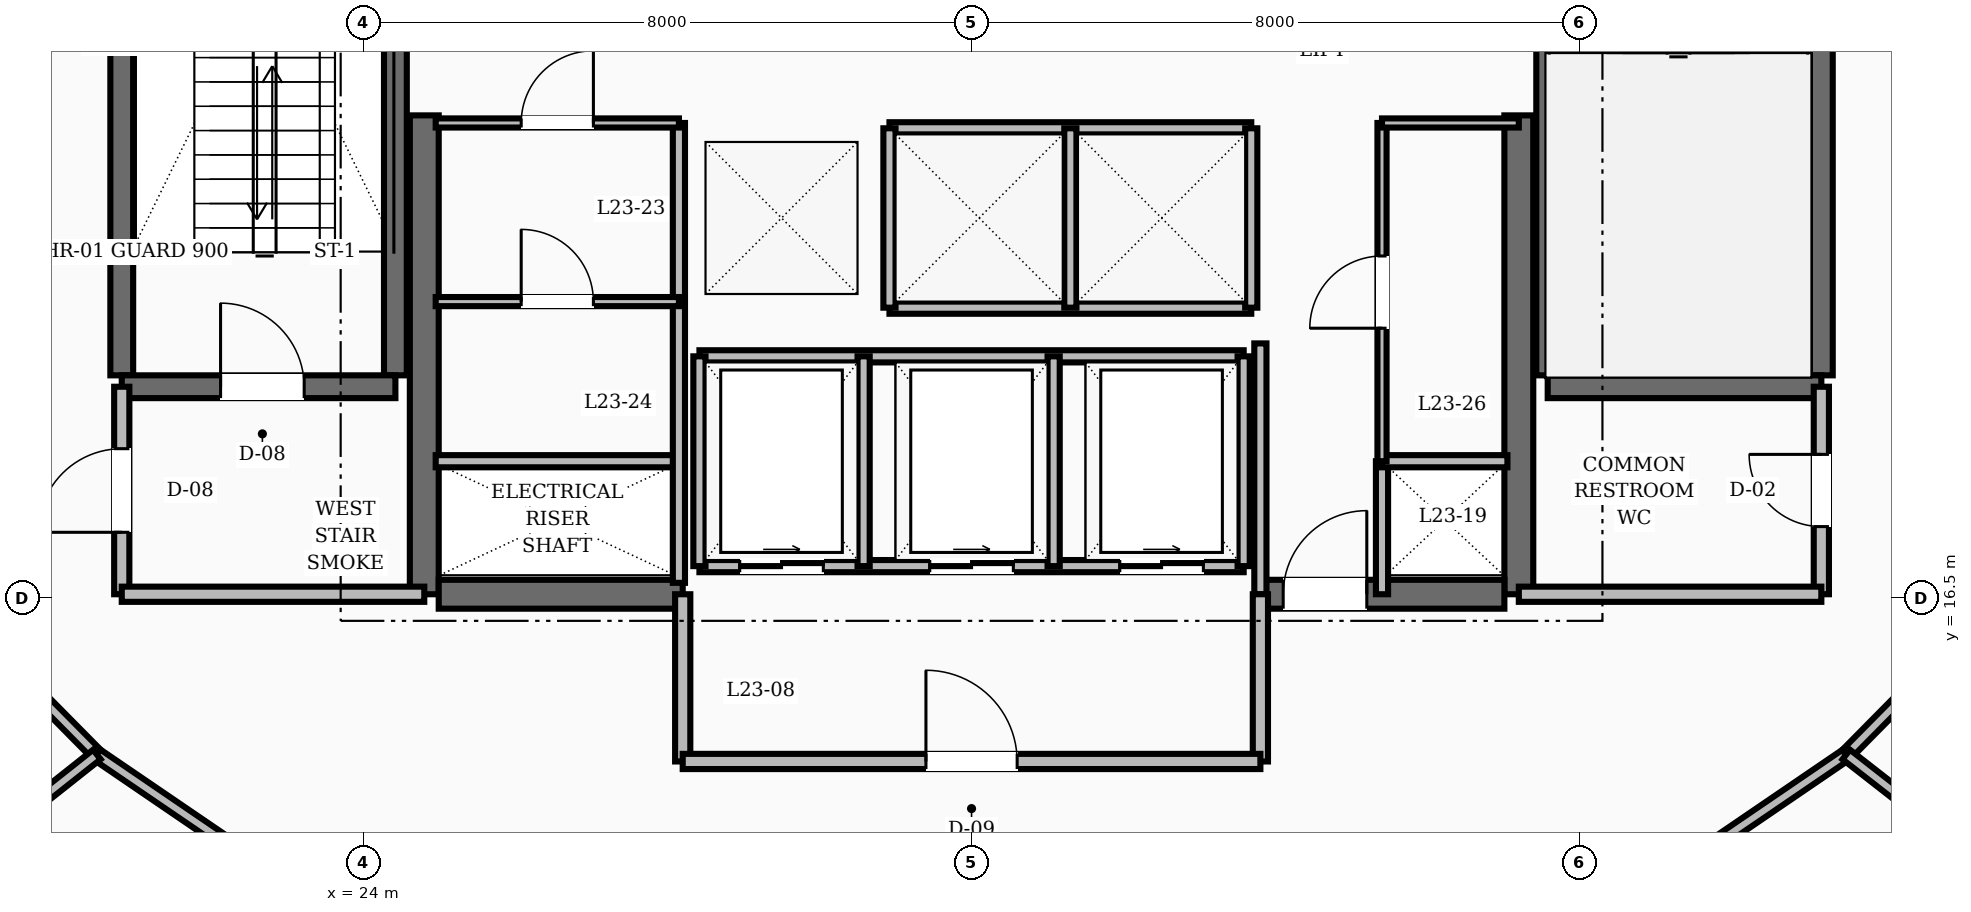
"""IFC4 building model, lengths in metres.
Left out: names, types, materials, properties, quantities, classifications, styles, units other than length and angle.
Written with IfcOpenShell. Run it as: python <this file> out.ifc"""

import sys

from ifc_helpers import new_model, si_unit, direction, frame, frame_2d, origin, place, context, subcontext, project, spatial, rectangle, extrude, element, fill, save


model = new_model("IFC4")
c1 = context("Model", 3, precision=1e-05, world=origin(), true_north=direction((0.0, 1.0)))
c2 = subcontext(c1, "Body", "Model", "MODEL_VIEW")
j1 = project(units=[si_unit("LENGTHUNIT", "METRE"), si_unit("PLANEANGLEUNIT", "RADIAN")], contexts=[c1])
p1 = place(None, origin())
s1 = spatial("IfcSite", under=j1, at=p1, CompositionType="ELEMENT")
p2 = place(p1, origin())
s2 = spatial("IfcBuilding", under=s1, at=p2, CompositionType="ELEMENT")
p3 = place(p2, frame((0.0, 0.0, 91.6)))
s3 = spatial("IfcBuildingStorey", under=s2, at=p3, CompositionType="ELEMENT", Elevation=91.6)
for number, where, z_axis, x_axis in (
    (1, (24.8, 16.55, 0.0), (0.0, 0.0, 1.0), (0.0, 1.0, 0.0)),
    (2, (39.2, 16.55, 0.0), (0.0, 0.0, 1.0), (0.0, 1.0, 0.0)),
):
    element("IfcWall", number, at=place(p3, frame(where, z_axis=z_axis, x_axis=x_axis)), inside=s3, PredefinedType="SHEAR", context=c2, shape_type="SweptSolid", body=[
        extrude(rectangle(XDim=6.3, YDim=0.38, at=frame_2d((3.15, 0.0))), origin(), (0.0, 0.0, 1.0), 3.6),
    ])
p4 = place(p3, frame((24.99, 16.55, 0.0), z_axis=(0.0, 0.0, 1.0), x_axis=(1.0, 0.0, 0.0)))
e3 = element("IfcWall", 3, at=p4, inside=s3, PredefinedType="SHEAR", context=c2, shape_type="SweptSolid", body=[
    extrude(rectangle(XDim=3.21, YDim=0.38, at=frame_2d((1.605, 0.0))), origin(), (0.0, 0.0, 1.0), 3.6),
])
p5 = place(p3, frame((35.8, 16.55, 0.0), z_axis=(0.0, 0.0, 1.0), x_axis=(1.0, 0.0, 0.0)))
e4 = element("IfcWall", 4, at=p5, inside=s3, PredefinedType="SHEAR", context=c2, shape_type="SweptSolid", body=[
    extrude(rectangle(XDim=3.21, YDim=0.38, at=frame_2d((1.605, 0.0))), origin(), (0.0, 0.0, 1.0), 3.6),
])
p6 = place(p5, frame((0.3, 0.0, 0.0)))
e5 = element("IfcOpeningElement", 5, at=p6, cuts=e4, PredefinedType="OPENING", context=c2, shape_type="SweptSolid", body=[
    extrude(rectangle(XDim=1.1, YDim=2.1, at=frame_2d((0.55, 1.05))), frame((0.0, 0.2, 0.0), z_axis=(0.0, -1.0, 0.0), x_axis=(1.0, 0.0, 0.0)), (0.0, 0.0, 1.0), 0.4),
])
for number, where, z_axis, x_axis in (
    (6, (20.82, 19.43, 0.0), (0.0, 0.0, 1.0), (0.0, 1.0, 0.0)),
    (7, (24.42, 19.43, 0.0), (0.0, 0.0, 1.0), (0.0, 1.0, 0.0)),
):
    element("IfcWall", number, at=place(p3, frame(where, z_axis=z_axis, x_axis=x_axis)), inside=s3, PredefinedType="SHEAR", context=c2, shape_type="SweptSolid", body=[
        extrude(rectangle(XDim=8.74, YDim=0.3, at=frame_2d((4.37, 0.0))), origin(), (0.0, 0.0, 1.0), 3.6),
    ])
p7 = place(p3, frame((20.82, 19.28, 0.0), z_axis=(0.0, 0.0, 1.0), x_axis=(1.0, 0.0, 0.0)))
e8 = element("IfcWall", 8, at=p7, inside=s3, PredefinedType="SHEAR", context=c2, shape_type="SweptSolid", body=[
    extrude(rectangle(XDim=3.6, YDim=0.3, at=frame_2d((1.8, 0.0))), origin(), (0.0, 0.0, 1.0), 3.6),
])
p8 = place(p7, frame((1.3, 0.0, 0.0)))
e9 = element("IfcOpeningElement", 9, at=p8, cuts=e8, PredefinedType="OPENING", context=c2, shape_type="SweptSolid", body=[
    extrude(rectangle(XDim=1.1, YDim=2.1, at=frame_2d((0.55, 1.05))), frame((0.0, 0.16, 0.0), z_axis=(0.0, -1.0, 0.0), x_axis=(1.0, 0.0, 0.0)), (0.0, 0.0, 1.0), 0.32),
])
for number, where, z_axis, x_axis in (
    (10, (43.18, 19.43, 0.0), (0.0, 0.0, 1.0), (0.0, 1.0, 0.0)),
    (11, (39.58, 19.43, 0.0), (0.0, 0.0, 1.0), (0.0, 1.0, 0.0)),
):
    element("IfcWall", number, at=place(p3, frame(where, z_axis=z_axis, x_axis=x_axis)), inside=s3, PredefinedType="SHEAR", context=c2, shape_type="SweptSolid", body=[
        extrude(rectangle(XDim=8.74, YDim=0.3, at=frame_2d((4.37, 0.0))), origin(), (0.0, 0.0, 1.0), 3.6),
    ])
p9 = place(p3, frame((39.58, 19.28, 0.0), z_axis=(0.0, 0.0, 1.0), x_axis=(1.0, 0.0, 0.0)))
e12 = element("IfcWall", 12, at=p9, inside=s3, PredefinedType="SHEAR", context=c2, shape_type="SweptSolid", body=[
    extrude(rectangle(XDim=3.6, YDim=0.3, at=frame_2d((1.8, 0.0))), origin(), (0.0, 0.0, 1.0), 3.6),
])
p10 = place(p3, frame((20.82, 16.55, 0.0), z_axis=(0.0, 0.0, 1.0), x_axis=(0.0, 1.0, 0.0)))
e13 = element("IfcWall", 13, at=p10, inside=s3, PredefinedType="SOLIDWALL", context=c2, shape_type="SweptSolid", body=[
    extrude(rectangle(XDim=2.73, YDim=0.2, at=frame_2d((1.365, 0.0))), origin(), (0.0, 0.0, 1.0), 2.71),
])
p11 = place(p10, frame((0.815, 0.0, 0.0)))
e14 = element("IfcOpeningElement", 14, at=p11, cuts=e13, PredefinedType="OPENING", context=c2, shape_type="SweptSolid", body=[
    extrude(rectangle(XDim=1.1, YDim=2.1, at=frame_2d((0.55, 1.05))), frame((0.0, 0.11, 0.0), z_axis=(0.0, -1.0, 0.0), x_axis=(1.0, 0.0, 0.0)), (0.0, 0.0, 1.0), 0.22),
])
p12 = place(p3, frame((20.82, 16.55, 0.0), z_axis=(0.0, 0.0, 1.0), x_axis=(1.0, 0.0, 0.0)))
e15 = element("IfcWall", 15, at=p12, inside=s3, PredefinedType="SOLIDWALL", context=c2, shape_type="SweptSolid", body=[
    extrude(rectangle(XDim=3.98, YDim=0.2, at=frame_2d((1.99, 0.0))), origin(), (0.0, 0.0, 1.0), 2.71),
])
p13 = place(p3, frame((43.18, 16.55, 0.0), z_axis=(0.0, 0.0, 1.0), x_axis=(0.0, 1.0, 0.0)))
e16 = element("IfcWall", 16, at=p13, inside=s3, PredefinedType="SOLIDWALL", context=c2, shape_type="SweptSolid", body=[
    extrude(rectangle(XDim=2.73, YDim=0.2, at=frame_2d((1.365, 0.0))), origin(), (0.0, 0.0, 1.0), 2.71),
])
p14 = place(p13, frame((0.89, 0.0, 0.0)))
e17 = element("IfcOpeningElement", 17, at=p14, cuts=e16, PredefinedType="OPENING", context=c2, shape_type="SweptSolid", body=[
    extrude(rectangle(XDim=0.95, YDim=2.1, at=frame_2d((0.475, 1.05))), frame((0.0, 0.11, 0.0), z_axis=(0.0, -1.0, 0.0), x_axis=(1.0, 0.0, 0.0)), (0.0, 0.0, 1.0), 0.22),
])
p15 = place(p3, frame((39.2, 16.55, 0.0), z_axis=(0.0, 0.0, 1.0), x_axis=(1.0, 0.0, 0.0)))
e18 = element("IfcWall", 18, at=p15, inside=s3, PredefinedType="SOLIDWALL", context=c2, shape_type="SweptSolid", body=[
    extrude(rectangle(XDim=3.98, YDim=0.2, at=frame_2d((1.99, 0.0))), origin(), (0.0, 0.0, 1.0), 2.71),
])
p16 = place(p3, frame((35.8, 16.55, 0.0), z_axis=(0.0, 0.0, 1.0), x_axis=(0.0, 1.0, 0.0)))
e19 = element("IfcWall", 19, at=p16, inside=s3, PredefinedType="SOLIDWALL", context=c2, shape_type="SweptSolid", body=[
    extrude(rectangle(XDim=3.3, YDim=0.16, at=frame_2d((1.65, 0.0))), origin(), (0.0, 0.0, 1.0), 2.71),
])
p17 = place(p3, frame((37.4, 16.55, 0.0), z_axis=(0.0, 0.0, 1.0), x_axis=(0.0, 1.0, 0.0)))
e20 = element("IfcWall", 20, at=p17, inside=s3, PredefinedType="SOLIDWALL", context=c2, shape_type="SweptSolid", body=[
    extrude(rectangle(XDim=1.75, YDim=0.16, at=frame_2d((0.875, 0.0))), origin(), (0.0, 0.0, 1.0), 2.71),
])
for number, where, z_axis, x_axis in (
    (21, (28.2, 14.35, 0.0), (0.0, 0.0, 1.0), (0.0, 1.0, 0.0)),
    (22, (35.8, 14.35, 0.0), (0.0, 0.0, 1.0), (0.0, 1.0, 0.0)),
):
    element("IfcWall", number, at=place(p3, frame(where, z_axis=z_axis, x_axis=x_axis)), inside=s3, PredefinedType="SOLIDWALL", context=c2, shape_type="SweptSolid", body=[
        extrude(rectangle(XDim=2.2, YDim=0.2, at=frame_2d((1.1, 0.0))), origin(), (0.0, 0.0, 1.0), 2.71),
    ])
p18 = place(p3, frame((28.2, 14.35, 0.0), z_axis=(0.0, 0.0, 1.0), x_axis=(1.0, 0.0, 0.0)))
e23 = element("IfcWall", 23, at=p18, inside=s3, PredefinedType="SOLIDWALL", context=c2, shape_type="SweptSolid", body=[
    extrude(rectangle(XDim=7.6, YDim=0.2, at=frame_2d((3.8, 0.0))), origin(), (0.0, 0.0, 1.0), 2.71),
])
p19 = place(p18, frame((3.2, 0.0, 0.0)))
e24 = element("IfcOpeningElement", 24, at=p19, cuts=e23, PredefinedType="OPENING", context=c2, shape_type="SweptSolid", body=[
    extrude(rectangle(XDim=1.2, YDim=2.1, at=frame_2d((0.6, 1.05))), frame((0.0, 0.11, 0.0), z_axis=(0.0, -1.0, 0.0), x_axis=(1.0, 0.0, 0.0)), (0.0, 0.0, 1.0), 0.22),
])
for number, where, z_axis, x_axis in (
    (25, (30.92, 22.68, 0.0), (0.0, 0.0, 1.0), (1.0, 0.0, 0.0)),
    (26, (30.92, 20.32, 0.0), (0.0, 0.0, 1.0), (1.0, 0.0, 0.0)),
):
    element("IfcWall", number, at=place(p3, frame(where, z_axis=z_axis, x_axis=x_axis)), inside=s3, PredefinedType="SOLIDWALL", context=c2, shape_type="SweptSolid", body=[
        extrude(rectangle(XDim=4.76, YDim=0.16, at=frame_2d((2.38, 0.0))), origin(), (0.0, 0.0, 1.0), 2.71),
    ])
for number, where, z_axis, x_axis in (
    (27, (30.92, 20.32, 0.0), (0.0, 0.0, 1.0), (0.0, 1.0, 0.0)),
    (28, (33.3, 20.32, 0.0), (0.0, 0.0, 1.0), (0.0, 1.0, 0.0)),
    (29, (35.68, 20.32, 0.0), (0.0, 0.0, 1.0), (0.0, 1.0, 0.0)),
):
    element("IfcWall", number, at=place(p3, frame(where, z_axis=z_axis, x_axis=x_axis)), inside=s3, PredefinedType="SOLIDWALL", context=c2, shape_type="SweptSolid", body=[
        extrude(rectangle(XDim=2.36, YDim=0.16, at=frame_2d((1.18, 0.0))), origin(), (0.0, 0.0, 1.0), 2.71),
    ])
p20 = place(p3, frame((28.42, 16.92, 0.0), z_axis=(0.0, 0.0, 1.0), x_axis=(1.0, 0.0, 0.0)))
e30 = element("IfcWall", 30, at=p20, inside=s3, PredefinedType="SOLIDWALL", context=c2, shape_type="SweptSolid", body=[
    extrude(rectangle(XDim=7.16, YDim=0.16, at=frame_2d((3.58, 0.0))), origin(), (0.0, 0.0, 1.0), 2.71),
])
p21 = place(p20, frame((0.53, 0.0, 0.0)))
e31 = element("IfcOpeningElement", 31, at=p21, cuts=e30, PredefinedType="OPENING", context=c2, shape_type="SweptSolid", body=[
    extrude(rectangle(XDim=1.1, YDim=2.15, at=frame_2d((0.55, 1.075))), frame((0.0, 0.09, 0.0), z_axis=(0.0, -1.0, 0.0), x_axis=(1.0, 0.0, 0.0)), (0.0, 0.0, 1.0), 0.18),
])
p22 = place(p20, frame((3.03, 0.0, 0.0)))
e32 = element("IfcOpeningElement", 32, at=p22, cuts=e30, PredefinedType="OPENING", context=c2, shape_type="SweptSolid", body=[
    extrude(rectangle(XDim=1.1, YDim=2.15, at=frame_2d((0.55, 1.075))), frame((0.0, 0.09, 0.0), z_axis=(0.0, -1.0, 0.0), x_axis=(1.0, 0.0, 0.0)), (0.0, 0.0, 1.0), 0.18),
])
p23 = place(p20, frame((5.53, 0.0, 0.0)))
e33 = element("IfcOpeningElement", 33, at=p23, cuts=e30, PredefinedType="OPENING", context=c2, shape_type="SweptSolid", body=[
    extrude(rectangle(XDim=1.1, YDim=2.15, at=frame_2d((0.55, 1.075))), frame((0.0, 0.09, 0.0), z_axis=(0.0, -1.0, 0.0), x_axis=(1.0, 0.0, 0.0)), (0.0, 0.0, 1.0), 0.18),
])
p24 = place(p3, frame((28.42, 19.68, 0.0), z_axis=(0.0, 0.0, 1.0), x_axis=(1.0, 0.0, 0.0)))
e34 = element("IfcWall", 34, at=p24, inside=s3, PredefinedType="SOLIDWALL", context=c2, shape_type="SweptSolid", body=[
    extrude(rectangle(XDim=7.16, YDim=0.16, at=frame_2d((3.58, 0.0))), origin(), (0.0, 0.0, 1.0), 2.71),
])
for number, where, z_axis, x_axis in (
    (35, (28.42, 16.92, 0.0), (0.0, 0.0, 1.0), (0.0, 1.0, 0.0)),
    (36, (30.58, 16.92, 0.0), (0.0, 0.0, 1.0), (0.0, 1.0, 0.0)),
    (37, (33.08, 16.92, 0.0), (0.0, 0.0, 1.0), (0.0, 1.0, 0.0)),
    (38, (35.58, 16.92, 0.0), (0.0, 0.0, 1.0), (0.0, 1.0, 0.0)),
):
    element("IfcWall", number, at=place(p3, frame(where, z_axis=z_axis, x_axis=x_axis)), inside=s3, PredefinedType="SOLIDWALL", context=c2, shape_type="SweptSolid", body=[
        extrude(rectangle(XDim=2.76, YDim=0.16, at=frame_2d((1.38, 0.0))), origin(), (0.0, 0.0, 1.0), 2.71),
    ])
p25 = place(p3, frame((24.95, 18.3, 0.0), z_axis=(0.0, 0.0, 1.0), x_axis=(1.0, 0.0, 0.0)))
e39 = element("IfcWall", 39, at=p25, inside=s3, PredefinedType="SOLIDWALL", context=c2, shape_type="SweptSolid", body=[
    extrude(rectangle(XDim=3.2, YDim=0.16, at=frame_2d((1.6, 0.0))), origin(), (0.0, 0.0, 1.0), 2.71),
])
p26 = place(p3, frame((28.15, 16.7, 0.0), z_axis=(0.0, 0.0, 1.0), x_axis=(0.0, 1.0, 0.0)))
e40 = element("IfcWall", 40, at=p26, inside=s3, PredefinedType="SOLIDWALL", context=c2, shape_type="SweptSolid", body=[
    extrude(rectangle(XDim=6.05, YDim=0.16, at=frame_2d((3.025, 0.0))), origin(), (0.0, 0.0, 1.0), 2.71),
])
p27 = place(p3, frame((37.4, 18.3, 0.0), z_axis=(0.0, 0.0, 1.0), x_axis=(1.0, 0.0, 0.0)))
e41 = element("IfcWall", 41, at=p27, inside=s3, PredefinedType="SOLIDWALL", context=c2, shape_type="SweptSolid", body=[
    extrude(rectangle(XDim=1.65, YDim=0.16, at=frame_2d((0.825, 0.0))), origin(), (0.0, 0.0, 1.0), 2.71),
])
p28 = place(p3, frame((24.95, 22.75, 0.0), z_axis=(0.0, 0.0, 1.0), x_axis=(1.0, 0.0, 0.0)))
e42 = element("IfcWall", 42, at=p28, inside=s3, PredefinedType="PARTITIONING", context=c2, shape_type="SweptSolid", body=[
    extrude(rectangle(XDim=3.2, YDim=0.12, at=frame_2d((1.6, 0.0))), origin(), (0.0, 0.0, 1.0), 2.71),
])
p29 = place(p28, frame((1.125, 0.0, 0.0)))
e43 = element("IfcOpeningElement", 43, at=p29, cuts=e42, PredefinedType="OPENING", context=c2, shape_type="SweptSolid", body=[
    extrude(rectangle(XDim=0.95, YDim=2.1, at=frame_2d((0.475, 1.05))), frame((0.0, 0.07, 0.0), z_axis=(0.0, -1.0, 0.0), x_axis=(1.0, 0.0, 0.0)), (0.0, 0.0, 1.0), 0.14),
])
p30 = place(p3, frame((37.4, 18.3, 0.0), z_axis=(0.0, 0.0, 1.0), x_axis=(0.0, 1.0, 0.0)))
e44 = element("IfcWall", 44, at=p30, inside=s3, PredefinedType="PARTITIONING", context=c2, shape_type="SweptSolid", body=[
    extrude(rectangle(XDim=4.45, YDim=0.12, at=frame_2d((2.225, 0.0))), origin(), (0.0, 0.0, 1.0), 2.71),
])
p31 = place(p30, frame((1.75, 0.0, 0.0)))
e45 = element("IfcOpeningElement", 45, at=p31, cuts=e44, PredefinedType="OPENING", context=c2, shape_type="SweptSolid", body=[
    extrude(rectangle(XDim=0.95, YDim=2.1, at=frame_2d((0.475, 1.05))), frame((0.0, 0.07, 0.0), z_axis=(0.0, -1.0, 0.0), x_axis=(1.0, 0.0, 0.0)), (0.0, 0.0, 1.0), 0.14),
])
p32 = place(p3, frame((37.4, 22.75, 0.0), z_axis=(0.0, 0.0, 1.0), x_axis=(1.0, 0.0, 0.0)))
e46 = element("IfcWall", 46, at=p32, inside=s3, PredefinedType="PARTITIONING", context=c2, shape_type="SweptSolid", body=[
    extrude(rectangle(XDim=1.8, YDim=0.12, at=frame_2d((0.9, 0.0))), origin(), (0.0, 0.0, 1.0), 2.71),
])
p33 = place(p3, frame((24.95, 20.4, 0.0), z_axis=(0.0, 0.0, 1.0), x_axis=(1.0, 0.0, 0.0)))
e47 = element("IfcWall", 47, at=p33, inside=s3, PredefinedType="PARTITIONING", context=c2, shape_type="SweptSolid", body=[
    extrude(rectangle(XDim=3.2, YDim=0.12, at=frame_2d((1.6, 0.0))), origin(), (0.0, 0.0, 1.0), 2.71),
])
p34 = place(p33, frame((1.125, 0.0, 0.0)))
e48 = element("IfcOpeningElement", 48, at=p34, cuts=e47, PredefinedType="OPENING", context=c2, shape_type="SweptSolid", body=[
    extrude(rectangle(XDim=0.95, YDim=2.1, at=frame_2d((0.475, 1.05))), frame((0.0, 0.07, 0.0), z_axis=(0.0, -1.0, 0.0), x_axis=(1.0, 0.0, 0.0)), (0.0, 0.0, 1.0), 0.14),
])
p35 = place(p3, frame((18.469, 16.49, 0.0), z_axis=(0.0, 0.0, 1.0), x_axis=(0.702811997, -0.711375636969, 0.0)))
e49 = element("IfcWall", 49, at=p35, inside=s3, PredefinedType="SOLIDWALL", context=c2, shape_type="SweptSolid", body=[
    extrude(rectangle(XDim=2.879, YDim=0.16, at=frame_2d((1.44, 0.0))), origin(), (0.0, 0.0, 1.0), 2.71),
])
for number, where, z_axis, x_axis in (
    (50, (20.492, 14.441, 0.0), (0.0, 0.0, 1.0), (0.826, -0.563, 0.0)),
    (51, (41.041, 12.76, 0.0), (0.0, 0.0, 1.0), (0.826, 0.563, 0.0)),
):
    element("IfcWall", number, at=place(p3, frame(where, z_axis=z_axis, x_axis=x_axis)), inside=s3, PredefinedType="SOLIDWALL", context=c2, shape_type="SweptSolid", body=[
        extrude(rectangle(XDim=2.985, YDim=0.16, at=frame_2d((1.492, 0.0))), origin(), (0.0, 0.0, 1.0), 2.71),
    ])
p36 = place(p3, frame((43.508, 14.441, 0.0), z_axis=(0.0, 0.0, 1.0), x_axis=(0.702811997, 0.711375636969, 0.0)))
e52 = element("IfcWall", 52, at=p36, inside=s3, PredefinedType="SOLIDWALL", context=c2, shape_type="SweptSolid", body=[
    extrude(rectangle(XDim=2.879, YDim=0.16, at=frame_2d((1.44, 0.0))), origin(), (0.0, 0.0, 1.0), 2.71),
])
p37 = place(p3, frame((43.508, 14.441, 0.0), z_axis=(0.0, 0.0, 1.0), x_axis=(0.788218918979, -0.615394942914, 0.0)))
e53 = element("IfcWall", 53, at=p37, inside=s3, PredefinedType="SOLIDWALL", context=c2, shape_type="SweptSolid", body=[
    extrude(rectangle(XDim=9.035, YDim=0.16, at=frame_2d((4.518, 0.0))), origin(), (0.0, 0.0, 1.0), 2.71),
])
p38 = place(p3, frame((20.492, 14.441, 0.0), z_axis=(0.0, 0.0, 1.0), x_axis=(-0.783820213827, -0.620987819846, 0.0)))
e54 = element("IfcWall", 54, at=p38, inside=s3, PredefinedType="SOLIDWALL", context=c2, shape_type="SweptSolid", body=[
    extrude(rectangle(XDim=9.591, YDim=0.16, at=frame_2d((4.796, 0.0))), origin(), (0.0, 0.0, 1.0), 2.71),
])
p39 = place(p8, origin())
e55 = element("IfcDoor", 55, at=p39, inside=s3, OperationType="SINGLE_SWING_LEFT", PredefinedType="DOOR", context=c2, shape_type="SweptSolid", body=[
    extrude(rectangle(XDim=1.1, YDim=2.1, at=frame_2d((0.55, 1.05))), frame((0.0, 0.025, 0.0), z_axis=(0.0, -1.0, 0.0), x_axis=(1.0, 0.0, 0.0)), (0.0, 0.0, 1.0), 0.05),
])
fill(e9, e55)
p40 = place(p11, origin())
e56 = element("IfcDoor", 56, at=p40, inside=s3, OperationType="SINGLE_SWING_LEFT", PredefinedType="DOOR", context=c2, shape_type="SweptSolid", body=[
    extrude(rectangle(XDim=1.1, YDim=2.1, at=frame_2d((0.55, 1.05))), frame((0.0, 0.025, 0.0), z_axis=(0.0, -1.0, 0.0), x_axis=(1.0, 0.0, 0.0)), (0.0, 0.0, 1.0), 0.05),
])
fill(e14, e56)
p41 = place(p14, origin())
e57 = element("IfcDoor", 57, at=p41, inside=s3, OperationType="SINGLE_SWING_RIGHT", PredefinedType="DOOR", context=c2, shape_type="SweptSolid", body=[
    extrude(rectangle(XDim=0.95, YDim=2.1, at=frame_2d((0.475, 1.05))), frame((0.0, 0.025, 0.0), z_axis=(0.0, -1.0, 0.0), x_axis=(1.0, 0.0, 0.0)), (0.0, 0.0, 1.0), 0.05),
])
fill(e17, e57)
p42 = place(p6, origin())
e58 = element("IfcDoor", 58, at=p42, inside=s3, OperationType="SINGLE_SWING_RIGHT", PredefinedType="DOOR", context=c2, shape_type="SweptSolid", body=[
    extrude(rectangle(XDim=1.1, YDim=2.1, at=frame_2d((0.55, 1.05))), frame((0.0, 0.025, 0.0), z_axis=(0.0, -1.0, 0.0), x_axis=(1.0, 0.0, 0.0)), (0.0, 0.0, 1.0), 0.05),
])
fill(e5, e58)
p43 = place(p19, origin())
e59 = element("IfcDoor", 59, at=p43, inside=s3, OperationType="SINGLE_SWING_LEFT", PredefinedType="DOOR", context=c2, shape_type="SweptSolid", body=[
    extrude(rectangle(XDim=1.2, YDim=2.1, at=frame_2d((0.6, 1.05))), frame((0.0, 0.025, 0.0), z_axis=(0.0, -1.0, 0.0), x_axis=(1.0, 0.0, 0.0)), (0.0, 0.0, 1.0), 0.05),
])
fill(e24, e59)
p44 = place(p21, origin())
e60 = element("IfcDoor", 60, at=p44, inside=s3, OperationType="SLIDING_TO_RIGHT", PredefinedType="DOOR", context=c2, shape_type="SweptSolid", body=[
    extrude(rectangle(XDim=1.1, YDim=2.15, at=frame_2d((0.55, 1.075))), frame((0.0, 0.025, 0.0), z_axis=(0.0, -1.0, 0.0), x_axis=(1.0, 0.0, 0.0)), (0.0, 0.0, 1.0), 0.05),
])
fill(e31, e60)
p45 = place(p22, origin())
e61 = element("IfcDoor", 61, at=p45, inside=s3, OperationType="SLIDING_TO_RIGHT", PredefinedType="DOOR", context=c2, shape_type="SweptSolid", body=[
    extrude(rectangle(XDim=1.1, YDim=2.15, at=frame_2d((0.55, 1.075))), frame((0.0, 0.025, 0.0), z_axis=(0.0, -1.0, 0.0), x_axis=(1.0, 0.0, 0.0)), (0.0, 0.0, 1.0), 0.05),
])
fill(e32, e61)
p46 = place(p23, origin())
e62 = element("IfcDoor", 62, at=p46, inside=s3, OperationType="SLIDING_TO_RIGHT", PredefinedType="DOOR", context=c2, shape_type="SweptSolid", body=[
    extrude(rectangle(XDim=1.1, YDim=2.15, at=frame_2d((0.55, 1.075))), frame((0.0, 0.025, 0.0), z_axis=(0.0, -1.0, 0.0), x_axis=(1.0, 0.0, 0.0)), (0.0, 0.0, 1.0), 0.05),
])
fill(e33, e62)
p47 = place(p29, origin())
e63 = element("IfcDoor", 63, at=p47, inside=s3, OperationType="SINGLE_SWING_RIGHT", PredefinedType="DOOR", context=c2, shape_type="SweptSolid", body=[
    extrude(rectangle(XDim=0.95, YDim=2.1, at=frame_2d((0.475, 1.05))), frame((0.0, 0.025, 0.0), z_axis=(0.0, -1.0, 0.0), x_axis=(1.0, 0.0, 0.0)), (0.0, 0.0, 1.0), 0.05),
])
fill(e43, e63)
p48 = place(p34, origin())
e64 = element("IfcDoor", 64, at=p48, inside=s3, OperationType="SINGLE_SWING_LEFT", PredefinedType="DOOR", context=c2, shape_type="SweptSolid", body=[
    extrude(rectangle(XDim=0.95, YDim=2.1, at=frame_2d((0.475, 1.05))), frame((0.0, 0.025, 0.0), z_axis=(0.0, -1.0, 0.0), x_axis=(1.0, 0.0, 0.0)), (0.0, 0.0, 1.0), 0.05),
])
fill(e48, e64)
p49 = place(p31, origin())
e65 = element("IfcDoor", 65, at=p49, inside=s3, OperationType="SINGLE_SWING_LEFT", PredefinedType="DOOR", context=c2, shape_type="SweptSolid", body=[
    extrude(rectangle(XDim=0.95, YDim=2.1, at=frame_2d((0.475, 1.05))), frame((0.0, 0.025, 0.0), z_axis=(0.0, -1.0, 0.0), x_axis=(1.0, 0.0, 0.0)), (0.0, 0.0, 1.0), 0.05),
])
fill(e45, e65)
save(model, sys.argv[1])
